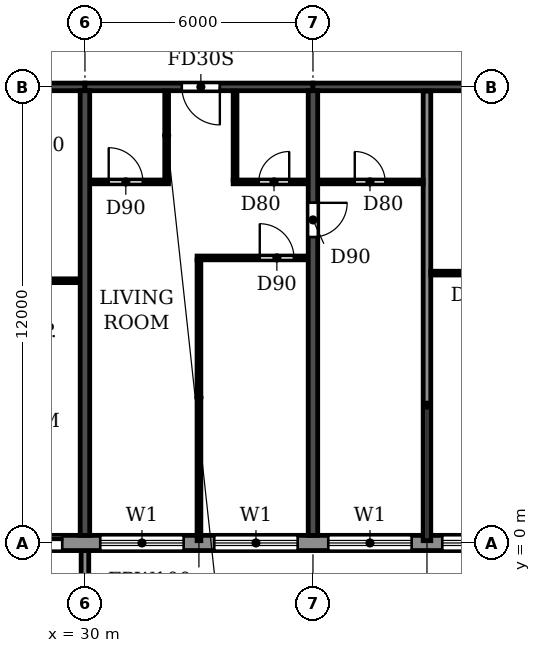
"""IFC4 building model, lengths in metres.
Left out: names, types, materials, properties, quantities, classifications, styles, units other than length and angle.
Written with IfcOpenShell. Run it as: python <this file> out.ifc"""

import sys

from ifc_helpers import new_model, si_unit, direction, frame, frame_2d, origin, place, context, subcontext, project, spatial, polyline, rectangle, outline, extrude, source, transform, mapped, element, fill, save


model = new_model("IFC4")
c1 = context("Model", 3, precision=1e-05, world=origin(), true_north=direction((0.0, 1.0)))
c2 = subcontext(c1, "Body", "Model", "MODEL_VIEW")
j1 = project(units=[si_unit("LENGTHUNIT", "METRE"), si_unit("PLANEANGLEUNIT", "RADIAN")], contexts=[c1])
p1 = place(None, origin())
s1 = spatial("IfcSite", under=j1, at=p1, CompositionType="ELEMENT")
p2 = place(p1, origin())
s2 = spatial("IfcBuilding", under=s1, at=p2, CompositionType="ELEMENT")
p3 = place(p2, frame((0.0, 0.0, 181.8)))
s3 = spatial("IfcBuildingStorey", under=s2, at=p3, CompositionType="ELEMENT", Elevation=181.8)
p4 = place(p3, frame((30.0, 0.2, 0.0), z_axis=(0.0, 0.0, 1.0), x_axis=(0.0, 1.0, 0.0)))
e1 = element("IfcWall", 1, at=p4, inside=s3, PredefinedType="SHEAR", context=c2, shape_type="SweptSolid", body=[
    extrude(rectangle(XDim=11.7, YDim=0.25, at=frame_2d((5.85, 0.0))), origin(), (0.0, 0.0, 1.0), 3.08),
])
p5 = place(p3, frame((36.0, 0.2, 0.0), z_axis=(0.0, 0.0, 1.0), x_axis=(0.0, 1.0, 0.0)))
e2 = element("IfcWall", 2, at=p5, inside=s3, PredefinedType="SHEAR", context=c2, shape_type="SweptSolid", body=[
    extrude(rectangle(XDim=11.7, YDim=0.25, at=frame_2d((5.85, 0.0))), origin(), (0.0, 0.0, 1.0), 3.08),
])
p6 = place(p5, frame((7.85, 0.0, 0.0)))
e3 = element("IfcOpeningElement", 3, at=p6, cuts=e2, PredefinedType="OPENING", context=c2, shape_type="SweptSolid", body=[
    extrude(rectangle(XDim=0.9, YDim=2.1, at=frame_2d((0.45, 1.05))), frame((0.0, 0.135, 0.0), z_axis=(0.0, -1.0, 0.0), x_axis=(1.0, 0.0, 0.0)), (0.0, 0.0, 1.0), 0.27),
])
p7 = place(p3, frame((24.0, 12.0, 0.0), z_axis=(0.0, 0.0, 1.0), x_axis=(1.0, 0.0, 0.0)))
e4 = element("IfcWall", 4, at=p7, inside=s3, PredefinedType="SHEAR", context=c2, shape_type="SweptSolid", body=[
    extrude(rectangle(XDim=6.0, YDim=0.2, at=frame_2d((3.0, 0.0))), origin(), (0.0, 0.0, 1.0), 2.48),
])
p8 = place(p7, frame((2.55, 0.0, 0.0)))
e5 = element("IfcOpeningElement", 5, at=p8, cuts=e4, PredefinedType="OPENING", context=c2, shape_type="SweptSolid", body=[
    extrude(rectangle(XDim=1.0, YDim=2.1, at=frame_2d((0.5, 1.05))), frame((0.0, 0.11, 0.0), z_axis=(0.0, -1.0, 0.0), x_axis=(1.0, 0.0, 0.0)), (0.0, 0.0, 1.0), 0.22),
])
p9 = place(p3, frame((30.0, 12.0, 0.0), z_axis=(0.0, 0.0, 1.0), x_axis=(1.0, 0.0, 0.0)))
e6 = element("IfcWall", 6, at=p9, inside=s3, PredefinedType="SHEAR", context=c2, shape_type="SweptSolid", body=[
    extrude(rectangle(XDim=6.0, YDim=0.2, at=frame_2d((3.0, 0.0))), origin(), (0.0, 0.0, 1.0), 2.48),
])
p10 = place(p9, frame((2.55, 0.0, 0.0)))
e7 = element("IfcOpeningElement", 7, at=p10, cuts=e6, PredefinedType="OPENING", context=c2, shape_type="SweptSolid", body=[
    extrude(rectangle(XDim=1.0, YDim=2.1, at=frame_2d((0.5, 1.05))), frame((0.0, 0.11, 0.0), z_axis=(0.0, -1.0, 0.0), x_axis=(1.0, 0.0, 0.0)), (0.0, 0.0, 1.0), 0.22),
])
p11 = place(p3, frame((36.0, 12.0, 0.0), z_axis=(0.0, 0.0, 1.0), x_axis=(1.0, 0.0, 0.0)))
e8 = element("IfcWall", 8, at=p11, inside=s3, PredefinedType="SHEAR", context=c2, shape_type="SweptSolid", body=[
    extrude(rectangle(XDim=6.0, YDim=0.2, at=frame_2d((3.0, 0.0))), origin(), (0.0, 0.0, 1.0), 2.48),
])
p12 = place(p3, frame((22.683, 0.0, 0.0), z_axis=(0.0, 0.0, 1.0), x_axis=(1.0, 0.0, 0.0)))
e9 = element("IfcWall", 9, at=p12, inside=s3, PredefinedType="STANDARD", context=c2, shape_type="SweptSolid", body=[
    extrude(rectangle(XDim=56.634, YDim=0.4, at=frame_2d((28.317, 0.0))), origin(), (0.0, 0.0, 1.0), 3.08),
])
p13 = place(p12, frame((1.717, 0.0, 0.9)))
e10 = element("IfcOpeningElement", 10, at=p13, cuts=e9, PredefinedType="OPENING", context=c2, shape_type="SweptSolid", body=[
    extrude(rectangle(XDim=2.2, YDim=1.5, at=frame_2d((1.1, 0.75))), frame((0.0, 0.21, 0.0), z_axis=(0.0, -1.0, 0.0), x_axis=(1.0, 0.0, 0.0)), (0.0, 0.0, 1.0), 0.42),
])
p14 = place(p12, frame((4.917, 0.0, 0.0)))
e11 = element("IfcOpeningElement", 11, at=p14, cuts=e9, PredefinedType="OPENING", context=c2, shape_type="SweptSolid", body=[
    extrude(rectangle(XDim=1.8, YDim=2.4, at=frame_2d((0.9, 1.2))), frame((0.0, 0.21, 0.0), z_axis=(0.0, -1.0, 0.0), x_axis=(1.0, 0.0, 0.0)), (0.0, 0.0, 1.0), 0.42),
])
p15 = place(p12, frame((7.717, 0.0, 0.9)))
e12 = element("IfcOpeningElement", 12, at=p15, cuts=e9, PredefinedType="OPENING", context=c2, shape_type="SweptSolid", body=[
    extrude(rectangle(XDim=2.2, YDim=1.5, at=frame_2d((1.1, 0.75))), frame((0.0, 0.21, 0.0), z_axis=(0.0, -1.0, 0.0), x_axis=(1.0, 0.0, 0.0)), (0.0, 0.0, 1.0), 0.42),
])
p16 = place(p12, frame((10.717, 0.0, 0.9)))
e13 = element("IfcOpeningElement", 13, at=p16, cuts=e9, PredefinedType="OPENING", context=c2, shape_type="SweptSolid", body=[
    extrude(rectangle(XDim=2.2, YDim=1.5, at=frame_2d((1.1, 0.75))), frame((0.0, 0.21, 0.0), z_axis=(0.0, -1.0, 0.0), x_axis=(1.0, 0.0, 0.0)), (0.0, 0.0, 1.0), 0.42),
])
p17 = place(p12, frame((13.717, 0.0, 0.9)))
e14 = element("IfcOpeningElement", 14, at=p17, cuts=e9, PredefinedType="OPENING", context=c2, shape_type="SweptSolid", body=[
    extrude(rectangle(XDim=2.2, YDim=1.5, at=frame_2d((1.1, 0.75))), frame((0.0, 0.21, 0.0), z_axis=(0.0, -1.0, 0.0), x_axis=(1.0, 0.0, 0.0)), (0.0, 0.0, 1.0), 0.42),
])
p18 = place(p12, frame((16.717, 0.0, 0.9)))
e15 = element("IfcOpeningElement", 15, at=p18, cuts=e9, PredefinedType="OPENING", context=c2, shape_type="SweptSolid", body=[
    extrude(rectangle(XDim=2.2, YDim=1.5, at=frame_2d((1.1, 0.75))), frame((0.0, 0.21, 0.0), z_axis=(0.0, -1.0, 0.0), x_axis=(1.0, 0.0, 0.0)), (0.0, 0.0, 1.0), 0.42),
])
p19 = place(p12, frame((19.717, 0.0, 0.9)))
e16 = element("IfcOpeningElement", 16, at=p19, cuts=e9, PredefinedType="OPENING", context=c2, shape_type="SweptSolid", body=[
    extrude(rectangle(XDim=2.2, YDim=1.5, at=frame_2d((1.1, 0.75))), frame((0.0, 0.21, 0.0), z_axis=(0.0, -1.0, 0.0), x_axis=(1.0, 0.0, 0.0)), (0.0, 0.0, 1.0), 0.42),
])
p20 = place(p12, frame((22.717, 0.0, 0.9)))
e17 = element("IfcOpeningElement", 17, at=p20, cuts=e9, PredefinedType="OPENING", context=c2, shape_type="SweptSolid", body=[
    extrude(rectangle(XDim=2.2, YDim=1.5, at=frame_2d((1.1, 0.75))), frame((0.0, 0.21, 0.0), z_axis=(0.0, -1.0, 0.0), x_axis=(1.0, 0.0, 0.0)), (0.0, 0.0, 1.0), 0.42),
])
p21 = place(p12, frame((25.717, 0.0, 0.9)))
e18 = element("IfcOpeningElement", 18, at=p21, cuts=e9, PredefinedType="OPENING", context=c2, shape_type="SweptSolid", body=[
    extrude(rectangle(XDim=2.2, YDim=1.5, at=frame_2d((1.1, 0.75))), frame((0.0, 0.21, 0.0), z_axis=(0.0, -1.0, 0.0), x_axis=(1.0, 0.0, 0.0)), (0.0, 0.0, 1.0), 0.42),
])
p22 = place(p12, frame((28.717, 0.0, 0.9)))
e19 = element("IfcOpeningElement", 19, at=p22, cuts=e9, PredefinedType="OPENING", context=c2, shape_type="SweptSolid", body=[
    extrude(rectangle(XDim=2.2, YDim=1.5, at=frame_2d((1.1, 0.75))), frame((0.0, 0.21, 0.0), z_axis=(0.0, -1.0, 0.0), x_axis=(1.0, 0.0, 0.0)), (0.0, 0.0, 1.0), 0.42),
])
p23 = place(p12, frame((31.717, 0.0, 0.9)))
e20 = element("IfcOpeningElement", 20, at=p23, cuts=e9, PredefinedType="OPENING", context=c2, shape_type="SweptSolid", body=[
    extrude(rectangle(XDim=2.2, YDim=1.5, at=frame_2d((1.1, 0.75))), frame((0.0, 0.21, 0.0), z_axis=(0.0, -1.0, 0.0), x_axis=(1.0, 0.0, 0.0)), (0.0, 0.0, 1.0), 0.42),
])
p24 = place(p12, frame((34.717, 0.0, 0.9)))
e21 = element("IfcOpeningElement", 21, at=p24, cuts=e9, PredefinedType="OPENING", context=c2, shape_type="SweptSolid", body=[
    extrude(rectangle(XDim=2.2, YDim=1.5, at=frame_2d((1.1, 0.75))), frame((0.0, 0.21, 0.0), z_axis=(0.0, -1.0, 0.0), x_axis=(1.0, 0.0, 0.0)), (0.0, 0.0, 1.0), 0.42),
])
p25 = place(p12, frame((37.917, 0.0, 0.0)))
e22 = element("IfcOpeningElement", 22, at=p25, cuts=e9, PredefinedType="OPENING", context=c2, shape_type="SweptSolid", body=[
    extrude(rectangle(XDim=1.8, YDim=2.4, at=frame_2d((0.9, 1.2))), frame((0.0, 0.21, 0.0), z_axis=(0.0, -1.0, 0.0), x_axis=(1.0, 0.0, 0.0)), (0.0, 0.0, 1.0), 0.42),
])
p26 = place(p12, frame((40.717, 0.0, 0.9)))
e23 = element("IfcOpeningElement", 23, at=p26, cuts=e9, PredefinedType="OPENING", context=c2, shape_type="SweptSolid", body=[
    extrude(rectangle(XDim=2.2, YDim=1.5, at=frame_2d((1.1, 0.75))), frame((0.0, 0.21, 0.0), z_axis=(0.0, -1.0, 0.0), x_axis=(1.0, 0.0, 0.0)), (0.0, 0.0, 1.0), 0.42),
])
p27 = place(p12, frame((43.717, 0.0, 0.9)))
e24 = element("IfcOpeningElement", 24, at=p27, cuts=e9, PredefinedType="OPENING", context=c2, shape_type="SweptSolid", body=[
    extrude(rectangle(XDim=2.2, YDim=1.5, at=frame_2d((1.1, 0.75))), frame((0.0, 0.21, 0.0), z_axis=(0.0, -1.0, 0.0), x_axis=(1.0, 0.0, 0.0)), (0.0, 0.0, 1.0), 0.42),
])
p28 = place(p12, frame((46.717, 0.0, 0.9)))
e25 = element("IfcOpeningElement", 25, at=p28, cuts=e9, PredefinedType="OPENING", context=c2, shape_type="SweptSolid", body=[
    extrude(rectangle(XDim=2.2, YDim=1.5, at=frame_2d((1.1, 0.75))), frame((0.0, 0.21, 0.0), z_axis=(0.0, -1.0, 0.0), x_axis=(1.0, 0.0, 0.0)), (0.0, 0.0, 1.0), 0.42),
])
p29 = place(p12, frame((49.917, 0.0, 0.0)))
e26 = element("IfcOpeningElement", 26, at=p29, cuts=e9, PredefinedType="OPENING", context=c2, shape_type="SweptSolid", body=[
    extrude(rectangle(XDim=1.8, YDim=2.4, at=frame_2d((0.9, 1.2))), frame((0.0, 0.21, 0.0), z_axis=(0.0, -1.0, 0.0), x_axis=(1.0, 0.0, 0.0)), (0.0, 0.0, 1.0), 0.42),
])
p30 = place(p12, frame((52.717, 0.0, 0.9)))
e27 = element("IfcOpeningElement", 27, at=p30, cuts=e9, PredefinedType="OPENING", context=c2, shape_type="SweptSolid", body=[
    extrude(rectangle(XDim=2.2, YDim=1.5, at=frame_2d((1.1, 0.75))), frame((0.0, 0.21, 0.0), z_axis=(0.0, -1.0, 0.0), x_axis=(1.0, 0.0, 0.0)), (0.0, 0.0, 1.0), 0.42),
])
m1 = source(origin(), c2, "Body", "SweptSolid", [
    extrude(outline(polyline([(0.0, 0.0), (0.2, 0.0), (0.2, 1.65), (0.0, 1.65), (0.0, 0.0)])), origin(), (0.0, 0.0, 1.0), 3.1),
])
p31 = place(p3, frame((29.9, -1.85, 0.0)))
e28 = element("IfcWall", 28, at=p31, inside=s3, PredefinedType="STANDARD", context=c2, shape_type="MappedRepresentation", body=[
    mapped(m1, transform((0.0, 0.0, 0.0))),
])
p32 = place(p3, frame((39.0, 0.06, 0.0), z_axis=(0.0, 0.0, 1.0), x_axis=(0.0, 1.0, 0.0)))
e29 = element("IfcWall", 29, at=p32, inside=s3, PredefinedType="PARTITIONING", context=c2, shape_type="SweptSolid", body=[
    extrude(rectangle(XDim=11.83, YDim=0.2, at=frame_2d((5.915, 0.0))), origin(), (0.0, 0.0, 1.0), 3.08),
])
p33 = place(p3, frame((27.9, 6.9, 0.0), z_axis=(0.0, 0.0, 1.0), x_axis=(1.0, 0.0, 0.0)))
e30 = element("IfcWall", 30, at=p33, inside=s3, PredefinedType="PARTITIONING", context=c2, shape_type="SweptSolid", body=[
    extrude(rectangle(XDim=1.965, YDim=0.1, at=frame_2d((0.982, 0.0))), origin(), (0.0, 0.0, 1.0), 3.08),
])
p34 = place(p3, frame((39.1, 7.1, 0.0), z_axis=(0.0, 0.0, 1.0), x_axis=(1.0, 0.0, 0.0)))
e31 = element("IfcWall", 31, at=p34, inside=s3, PredefinedType="PARTITIONING", context=c2, shape_type="SweptSolid", body=[
    extrude(rectangle(XDim=2.765, YDim=0.1, at=frame_2d((1.382, 0.0))), origin(), (0.0, 0.0, 1.0), 3.08),
])
p35 = place(p34, frame((1.0, 0.0, 0.0)))
e32 = element("IfcOpeningElement", 32, at=p35, cuts=e31, PredefinedType="OPENING", context=c2, shape_type="SweptSolid", body=[
    extrude(rectangle(XDim=0.8, YDim=2.1, at=frame_2d((0.4, 1.05))), frame((0.0, 0.06, 0.0), z_axis=(0.0, -1.0, 0.0), x_axis=(1.0, 0.0, 0.0)), (0.0, 0.0, 1.0), 0.12),
])
p36 = place(p3, frame((32.95, 7.5, 0.0), z_axis=(0.0, 0.0, 1.0), x_axis=(1.0, 0.0, 0.0)))
e33 = element("IfcWall", 33, at=p36, inside=s3, PredefinedType="PARTITIONING", context=c2, shape_type="SweptSolid", body=[
    extrude(rectangle(XDim=2.915, YDim=0.1, at=frame_2d((1.458, 0.0))), origin(), (0.0, 0.0, 1.0), 3.08),
])
p37 = place(p36, frame((1.65, 0.0, 0.0)))
e34 = element("IfcOpeningElement", 34, at=p37, cuts=e33, PredefinedType="OPENING", context=c2, shape_type="SweptSolid", body=[
    extrude(rectangle(XDim=0.9, YDim=2.1, at=frame_2d((0.45, 1.05))), frame((0.0, 0.06, 0.0), z_axis=(0.0, -1.0, 0.0), x_axis=(1.0, 0.0, 0.0)), (0.0, 0.0, 1.0), 0.12),
])
p38 = place(p3, frame((30.135, 9.5, 0.0), z_axis=(0.0, 0.0, 1.0), x_axis=(1.0, 0.0, 0.0)))
e35 = element("IfcWall", 35, at=p38, inside=s3, PredefinedType="PARTITIONING", context=c2, shape_type="SweptSolid", body=[
    extrude(rectangle(XDim=2.065, YDim=0.1, at=frame_2d((1.032, 0.0))), origin(), (0.0, 0.0, 1.0), 3.08),
])
p39 = place(p38, frame((0.49, 0.0, 0.0)))
e36 = element("IfcOpeningElement", 36, at=p39, cuts=e35, PredefinedType="OPENING", context=c2, shape_type="SweptSolid", body=[
    extrude(rectangle(XDim=0.9, YDim=2.1, at=frame_2d((0.45, 1.05))), frame((0.0, 0.06, 0.0), z_axis=(0.0, -1.0, 0.0), x_axis=(1.0, 0.0, 0.0)), (0.0, 0.0, 1.0), 0.12),
])
p40 = place(p3, frame((33.9, 9.5, 0.0), z_axis=(0.0, 0.0, 1.0), x_axis=(1.0, 0.0, 0.0)))
e37 = element("IfcWall", 37, at=p40, inside=s3, PredefinedType="PARTITIONING", context=c2, shape_type="SweptSolid", body=[
    extrude(rectangle(XDim=1.965, YDim=0.1, at=frame_2d((0.982, 0.0))), origin(), (0.0, 0.0, 1.0), 3.08),
])
p41 = place(p40, frame((0.675, 0.0, 0.0)))
e38 = element("IfcOpeningElement", 38, at=p41, cuts=e37, PredefinedType="OPENING", context=c2, shape_type="SweptSolid", body=[
    extrude(rectangle(XDim=0.8, YDim=2.1, at=frame_2d((0.4, 1.05))), frame((0.0, 0.06, 0.0), z_axis=(0.0, -1.0, 0.0), x_axis=(1.0, 0.0, 0.0)), (0.0, 0.0, 1.0), 0.12),
])
p42 = place(p3, frame((36.135, 9.5, 0.0), z_axis=(0.0, 0.0, 1.0), x_axis=(1.0, 0.0, 0.0)))
e39 = element("IfcWall", 39, at=p42, inside=s3, PredefinedType="PARTITIONING", context=c2, shape_type="SweptSolid", body=[
    extrude(rectangle(XDim=2.765, YDim=0.1, at=frame_2d((1.382, 0.0))), origin(), (0.0, 0.0, 1.0), 3.08),
])
p43 = place(p42, frame((0.965, 0.0, 0.0)))
e40 = element("IfcOpeningElement", 40, at=p43, cuts=e39, PredefinedType="OPENING", context=c2, shape_type="SweptSolid", body=[
    extrude(rectangle(XDim=0.8, YDim=2.1, at=frame_2d((0.4, 1.05))), frame((0.0, 0.06, 0.0), z_axis=(0.0, -1.0, 0.0), x_axis=(1.0, 0.0, 0.0)), (0.0, 0.0, 1.0), 0.12),
])
p44 = place(p3, frame((32.15, 9.55, 0.0), z_axis=(0.0, 0.0, 1.0), x_axis=(0.0, 1.0, 0.0)))
e41 = element("IfcWall", 41, at=p44, inside=s3, PredefinedType="PARTITIONING", context=c2, shape_type="SweptSolid", body=[
    extrude(rectangle(XDim=2.34, YDim=0.1, at=frame_2d((1.17, 0.0))), origin(), (0.0, 0.0, 1.0), 3.08),
])
p45 = place(p3, frame((33.0, 0.06, 0.0), z_axis=(0.0, 0.0, 1.0), x_axis=(0.0, 1.0, 0.0)))
e42 = element("IfcWall", 42, at=p45, inside=s3, PredefinedType="PARTITIONING", context=c2, shape_type="SweptSolid", body=[
    extrude(rectangle(XDim=7.39, YDim=0.1, at=frame_2d((3.695, 0.0))), origin(), (0.0, 0.0, 1.0), 3.08),
])
p46 = place(p3, frame((33.95, 9.55, 0.0), z_axis=(0.0, 0.0, 1.0), x_axis=(0.0, 1.0, 0.0)))
e43 = element("IfcWall", 43, at=p46, inside=s3, PredefinedType="PARTITIONING", context=c2, shape_type="SweptSolid", body=[
    extrude(rectangle(XDim=2.34, YDim=0.1, at=frame_2d((1.17, 0.0))), origin(), (0.0, 0.0, 1.0), 3.08),
])
p47 = place(p14, origin())
e44 = element("IfcDoor", 44, at=p47, inside=s3, OperationType="DOUBLE_DOOR_SLIDING", PredefinedType="DOOR", context=c2, shape_type="SweptSolid", body=[
    extrude(rectangle(XDim=1.8, YDim=2.4, at=frame_2d((0.9, 1.2))), frame((0.0, 0.025, 0.0), z_axis=(0.0, -1.0, 0.0), x_axis=(1.0, 0.0, 0.0)), (0.0, 0.0, 1.0), 0.05),
])
fill(e11, e44)
p48 = place(p15, origin())
e45 = element("IfcWindow", 45, at=p48, inside=s3, PartitioningType="DOUBLE_PANEL_HORIZONTAL", PredefinedType="WINDOW", context=c2, shape_type="SweptSolid", body=[
    extrude(rectangle(XDim=2.2, YDim=1.5, at=frame_2d((1.1, 0.75))), frame((0.0, 0.03, 0.0), z_axis=(0.0, -1.0, 0.0), x_axis=(1.0, 0.0, 0.0)), (0.0, 0.0, 1.0), 0.06),
])
fill(e12, e45)
p49 = place(p16, origin())
e46 = element("IfcWindow", 46, at=p49, inside=s3, PartitioningType="DOUBLE_PANEL_HORIZONTAL", PredefinedType="WINDOW", context=c2, shape_type="SweptSolid", body=[
    extrude(rectangle(XDim=2.2, YDim=1.5, at=frame_2d((1.1, 0.75))), frame((0.0, 0.03, 0.0), z_axis=(0.0, -1.0, 0.0), x_axis=(1.0, 0.0, 0.0)), (0.0, 0.0, 1.0), 0.06),
])
fill(e13, e46)
p50 = place(p17, origin())
e47 = element("IfcWindow", 47, at=p50, inside=s3, PartitioningType="DOUBLE_PANEL_HORIZONTAL", PredefinedType="WINDOW", context=c2, shape_type="SweptSolid", body=[
    extrude(rectangle(XDim=2.2, YDim=1.5, at=frame_2d((1.1, 0.75))), frame((0.0, 0.03, 0.0), z_axis=(0.0, -1.0, 0.0), x_axis=(1.0, 0.0, 0.0)), (0.0, 0.0, 1.0), 0.06),
])
fill(e14, e47)
p51 = place(p18, origin())
e48 = element("IfcWindow", 48, at=p51, inside=s3, PartitioningType="DOUBLE_PANEL_HORIZONTAL", PredefinedType="WINDOW", context=c2, shape_type="SweptSolid", body=[
    extrude(rectangle(XDim=2.2, YDim=1.5, at=frame_2d((1.1, 0.75))), frame((0.0, 0.03, 0.0), z_axis=(0.0, -1.0, 0.0), x_axis=(1.0, 0.0, 0.0)), (0.0, 0.0, 1.0), 0.06),
])
fill(e15, e48)
p52 = place(p43, origin())
e49 = element("IfcDoor", 49, at=p52, inside=s3, OperationType="SINGLE_SWING_LEFT", PredefinedType="DOOR", context=c2, shape_type="SweptSolid", body=[
    extrude(rectangle(XDim=0.8, YDim=2.1, at=frame_2d((0.4, 1.05))), frame((0.0, 0.025, 0.0), z_axis=(0.0, -1.0, 0.0), x_axis=(1.0, 0.0, 0.0)), (0.0, 0.0, 1.0), 0.05),
])
fill(e40, e49)
p53 = place(p39, origin())
e50 = element("IfcDoor", 50, at=p53, inside=s3, OperationType="SINGLE_SWING_LEFT", PredefinedType="DOOR", context=c2, shape_type="SweptSolid", body=[
    extrude(rectangle(XDim=0.9, YDim=2.1, at=frame_2d((0.45, 1.05))), frame((0.0, 0.025, 0.0), z_axis=(0.0, -1.0, 0.0), x_axis=(1.0, 0.0, 0.0)), (0.0, 0.0, 1.0), 0.05),
])
fill(e36, e50)
p54 = place(p10, frame((1.0, 0.0, 0.0), z_axis=(0.0, 0.0, 1.0), x_axis=(-1.0, 0.0, 0.0)))
e51 = element("IfcDoor", 51, at=p54, inside=s3, OperationType="SINGLE_SWING_LEFT", PredefinedType="DOOR", context=c2, shape_type="SweptSolid", body=[
    extrude(rectangle(XDim=1.0, YDim=2.1, at=frame_2d((0.5, 1.05))), frame((0.0, 0.025, 0.0), z_axis=(0.0, -1.0, 0.0), x_axis=(1.0, 0.0, 0.0)), (0.0, 0.0, 1.0), 0.05),
])
fill(e7, e51)
p55 = place(p41, origin())
e52 = element("IfcDoor", 52, at=p55, inside=s3, OperationType="SINGLE_SWING_RIGHT", PredefinedType="DOOR", context=c2, shape_type="SweptSolid", body=[
    extrude(rectangle(XDim=0.8, YDim=2.1, at=frame_2d((0.4, 1.05))), frame((0.0, 0.025, 0.0), z_axis=(0.0, -1.0, 0.0), x_axis=(1.0, 0.0, 0.0)), (0.0, 0.0, 1.0), 0.05),
])
fill(e38, e52)
p56 = place(p37, origin())
e53 = element("IfcDoor", 53, at=p56, inside=s3, OperationType="SINGLE_SWING_LEFT", PredefinedType="DOOR", context=c2, shape_type="SweptSolid", body=[
    extrude(rectangle(XDim=0.9, YDim=2.1, at=frame_2d((0.45, 1.05))), frame((0.0, 0.025, 0.0), z_axis=(0.0, -1.0, 0.0), x_axis=(1.0, 0.0, 0.0)), (0.0, 0.0, 1.0), 0.05),
])
fill(e34, e53)
p57 = place(p6, frame((0.9, 0.0, 0.0), z_axis=(0.0, 0.0, 1.0), x_axis=(-1.0, 0.0, 0.0)))
e54 = element("IfcDoor", 54, at=p57, inside=s3, OperationType="SINGLE_SWING_LEFT", PredefinedType="DOOR", context=c2, shape_type="SweptSolid", body=[
    extrude(rectangle(XDim=0.9, YDim=2.1, at=frame_2d((0.45, 1.05))), frame((0.0, 0.025, 0.0), z_axis=(0.0, -1.0, 0.0), x_axis=(1.0, 0.0, 0.0)), (0.0, 0.0, 1.0), 0.05),
])
fill(e3, e54)
save(model, sys.argv[1])
